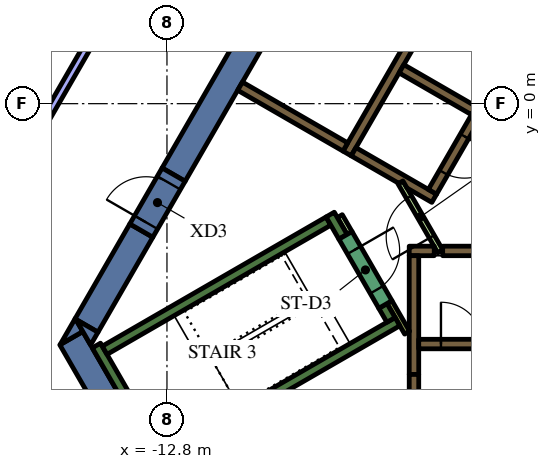
"""IFC4 building model, lengths in metres.
Left out: names, types, materials, properties, quantities, classifications, styles, units other than length and angle.
Written with IfcOpenShell. Run it as: python <this file> out.ifc"""

import sys

from ifc_helpers import new_model, si_unit, direction, frame, frame_2d, origin, place, context, subcontext, project, spatial, polyline, rectangle, outline, extrude, element, fill, save


model = new_model("IFC4")
c1 = context("Model", 3, precision=1e-05, world=origin(), true_north=direction((0.0, 1.0)))
c2 = subcontext(c1, "Body", "Model", "MODEL_VIEW")
j1 = project(units=[si_unit("LENGTHUNIT", "METRE"), si_unit("PLANEANGLEUNIT", "RADIAN")], contexts=[c1])
p1 = place(None, origin())
s1 = spatial("IfcSite", under=j1, at=p1, CompositionType="ELEMENT")
p2 = place(p1, origin())
s2 = spatial("IfcBuilding", under=s1, at=p2, CompositionType="ELEMENT")
p3 = place(p2, frame((0.0, 0.0, 235.2)))
s3 = spatial("IfcBuildingStorey", under=s2, at=p3, CompositionType="ELEMENT", Elevation=235.2)
p4 = place(p3, frame((-13.402, -9.487, 0.0), z_axis=(0.0, 0.0, 1.0), x_axis=(-0.500020498207, 0.866013568815, 0.0)))
e1 = element("IfcWall", 1, at=p4, inside=s3, PredefinedType="SOLIDWALL", context=c2, shape_type="SweptSolid", body=[
    extrude(rectangle(XDim=3.829, YDim=0.7, at=frame_2d((1.915, 0.0))), origin(), (0.0, 0.0, 1.0), 4.2),
])
p5 = place(p3, origin())
e2 = element("IfcWall", 2, at=p5, inside=s3, PredefinedType="SOLIDWALL", context=c2, shape_type="SweptSolid", body=[
    extrude(outline(polyline([(-15.014, -5.995), (-15.611, -6.339), (-15.213, -5.65), (-15.014, -5.995)])), origin(), (0.0, 0.0, 1.0), 4.2),
])
p6 = place(p3, frame((-13.475, -3.339, 0.0), z_axis=(0.0, 0.0, 1.0), x_axis=(-0.499944726303, -0.866057313716, 0.0)))
e3 = element("IfcWall", 3, at=p6, inside=s3, PredefinedType="SOLIDWALL", context=c2, shape_type="SweptSolid", body=[
    extrude(rectangle(XDim=2.884, YDim=0.7, at=frame_2d((1.442, 0.0))), origin(), (0.0, 0.0, 1.0), 4.2),
])
e4 = element("IfcWall", 4, at=p5, inside=s3, PredefinedType="SOLIDWALL", context=c2, shape_type="SweptSolid", body=[
    extrude(outline(polyline([(-14.809, -6.35), (-15.197, -5.678), (-14.615, -6.014), (-14.809, -6.35)])), origin(), (0.0, 0.0, 1.0), 4.2),
])
p7 = place(p3, frame((-12.625, -1.867, 0.0), z_axis=(0.0, 0.0, 1.0), x_axis=(0.500008520515, 0.866020484407, 0.0)))
e5 = element("IfcWall", 5, at=p7, inside=s3, PredefinedType="SOLIDWALL", context=c2, shape_type="SweptSolid", body=[
    extrude(rectangle(XDim=15.859, YDim=0.7, at=frame_2d((7.929, 0.0))), origin(), (0.0, 0.0, 1.0), 4.2),
])
p8 = place(p3, frame((-12.84, -9.511, 0.0), z_axis=(0.0, 0.0, 1.0), x_axis=(-0.499997733992, 0.866026712061, 0.0)))
e6 = element("IfcWall", 6, at=p8, inside=s3, PredefinedType="SOLIDWALL", context=c2, shape_type="SweptSolid", body=[
    extrude(rectangle(XDim=3.634, YDim=0.25, at=frame_2d((1.817, 0.0))), origin(), (0.0, 0.0, 1.0), 4.2),
])
p9 = place(p3, frame((-14.44, -6.49, 0.0), z_axis=(0.0, 0.0, 1.0), x_axis=(0.866022966069, 0.500004222222, 0.0)))
e7 = element("IfcWall", 7, at=p9, inside=s3, PredefinedType="SOLIDWALL", context=c2, shape_type="SweptSolid", body=[
    extrude(rectangle(XDim=6.8, YDim=0.25, at=frame_2d((3.4, 0.0))), origin(), (0.0, 0.0, 1.0), 4.2),
])
p10 = place(p3, frame((-8.168, -3.503, 0.0), z_axis=(0.0, 0.0, 1.0), x_axis=(-0.499952099219, 0.866053057547, 0.0)))
e8 = element("IfcWall", 8, at=p10, inside=s3, PredefinedType="SOLIDWALL", context=c2, shape_type="SweptSolid", body=[
    extrude(rectangle(XDim=0.675, YDim=0.25, at=frame_2d((0.337, 0.0))), origin(), (0.0, 0.0, 1.0), 4.2),
])
p11 = place(p3, frame((-12.84, -9.261, 0.0), z_axis=(0.0, 0.0, 1.0), x_axis=(0.866016039709, 0.500016218704, 0.0)))
e9 = element("IfcWall", 9, at=p11, inside=s3, PredefinedType="SOLIDWALL", context=c2, shape_type="SweptSolid", body=[
    extrude(rectangle(XDim=7.05, YDim=0.25, at=frame_2d((3.525, 0.0))), origin(), (0.0, 0.0, 1.0), 4.2),
])
p12 = place(p3, frame((-6.905, -5.69, 0.0), z_axis=(0.0, 0.0, 1.0), x_axis=(-0.500402024738, 0.865793170242, 0.0)))
e10 = element("IfcWall", 10, at=p12, inside=s3, PredefinedType="SOLIDWALL", context=c2, shape_type="SweptSolid", body=[
    extrude(rectangle(XDim=0.425, YDim=0.25, at=frame_2d((0.212, 0.0))), origin(), (0.0, 0.0, 1.0), 4.2),
])
p13 = place(p3, frame((-5.545, -3.875, 0.0), z_axis=(0.0, 0.0, 1.0), x_axis=(1.0, 0.0, 0.0)))
e11 = element("IfcWall", 11, at=p13, inside=s3, PredefinedType="SOLIDWALL", context=c2, shape_type="SweptSolid", body=[
    extrude(rectangle(XDim=11.97, YDim=0.25, at=frame_2d((5.985, 0.0))), origin(), (0.0, 0.0, 1.0), 4.2),
])
p14 = place(p3, frame((-6.425, -3.875, 0.0), z_axis=(0.0, 0.0, 1.0), x_axis=(1.0, 0.0, 0.0)))
e12 = element("IfcWall", 12, at=p14, inside=s3, PredefinedType="SOLIDWALL", context=c2, shape_type="SweptSolid", body=[
    extrude(rectangle(XDim=0.658, YDim=0.25, at=frame_2d((0.329, 0.0))), origin(), (0.0, 0.0, 1.0), 4.2),
])
p15 = place(p3, frame((-6.3, -7.125, 0.0), z_axis=(0.0, 0.0, 1.0), x_axis=(0.0, 1.0, 0.0)))
e13 = element("IfcWall", 13, at=p15, inside=s3, PredefinedType="SOLIDWALL", context=c2, shape_type="SweptSolid", body=[
    extrude(rectangle(XDim=3.125, YDim=0.25, at=frame_2d((1.562, 0.0))), origin(), (0.0, 0.0, 1.0), 4.2),
])
p16 = place(p3, frame((-8.06, -1.311, 0.0), z_axis=(0.0, 0.0, 1.0), x_axis=(0.50000273126, 0.866023826885, 0.0)))
e14 = element("IfcWall", 14, at=p16, inside=s3, PredefinedType="SOLIDWALL", context=c2, shape_type="SweptSolid", body=[
    extrude(rectangle(XDim=10.33, YDim=0.25, at=frame_2d((5.165, 0.0))), origin(), (0.0, 0.0, 1.0), 4.2),
])
p17 = place(p3, frame((-4.724, -0.182, 0.0), z_axis=(0.0, 0.0, 1.0), x_axis=(-0.866008176907, 0.50002983664, 0.0)))
e15 = element("IfcWall", 15, at=p17, inside=s3, PredefinedType="SOLIDWALL", context=c2, shape_type="SweptSolid", body=[
    extrude(rectangle(XDim=2.2, YDim=0.25, at=frame_2d((1.1, 0.0))), origin(), (0.0, 0.0, 1.0), 4.2),
])
e16 = element("IfcWall", 16, at=p5, inside=s3, PredefinedType="SOLIDWALL", context=c2, shape_type="SweptSolid", body=[
    extrude(outline(polyline([(-5.922, -2.257), (-5.922, -2.257), (-5.705, -2.382), (-5.83, -2.598), (-6.483, -2.221), (-6.591, -2.033), (-6.591, -2.033), (-6.7, -2.096), (-7.952, -1.373), (-7.827, -1.156), (-5.922, -2.257)])), origin(), (0.0, 0.0, 1.0), 4.2),
])
p18 = place(p3, frame((-8.106, -1.14, 0.0), z_axis=(0.0, 0.0, 1.0), x_axis=(-0.866008981251, 0.500028443584, 0.0)))
e17 = element("IfcWall", 17, at=p18, inside=s3, PredefinedType="SOLIDWALL", context=c2, shape_type="SweptSolid", body=[
    extrude(rectangle(XDim=3.2, YDim=0.25, at=frame_2d((1.6, 0.0))), origin(), (0.0, 0.0, 1.0), 4.2),
])
p19 = place(p3, frame((-8.252, -2.958, 0.0), z_axis=(0.0, 0.0, 1.0), x_axis=(0.500174715838, -0.865924508047, 0.0)))
e18 = element("IfcWall", 18, at=p19, inside=s3, PredefinedType="PARTITIONING", context=c2, shape_type="SweptSolid", body=[
    extrude(rectangle(XDim=0.514, YDim=0.15, at=frame_2d((0.257, 0.0))), origin(), (0.0, 0.0, 1.0), 3.45),
])
p20 = place(p3, frame((-6.48, -6.027, 0.0), z_axis=(0.0, 0.0, 1.0), x_axis=(-0.499927229454, 0.866067413802, 0.0)))
e19 = element("IfcWall", 19, at=p20, inside=s3, PredefinedType="PARTITIONING", context=c2, shape_type="SweptSolid", body=[
    extrude(rectangle(XDim=0.929, YDim=0.15, at=frame_2d((0.464, 0.0))), origin(), (0.0, 0.0, 1.0), 4.2),
])
p21 = place(p3, frame((-6.175, -6.325, 0.0), z_axis=(0.0, 0.0, 1.0), x_axis=(1.0, 0.0, 0.0)))
e20 = element("IfcWall", 20, at=p21, inside=s3, PredefinedType="SOLIDWALL", context=c2, shape_type="SweptSolid", body=[
    extrude(rectangle(XDim=12.35, YDim=0.25, at=frame_2d((6.175, 0.0))), origin(), (0.0, 0.0, 1.0), 4.2),
])
p22 = place(p21, frame((0.585, 0.0, 0.0)))
e21 = element("IfcOpeningElement", 21, at=p22, cuts=e20, PredefinedType="OPENING", context=c2, shape_type="SweptSolid", body=[
    extrude(rectangle(XDim=1.1, YDim=2.1, at=frame_2d((0.55, 1.05))), frame((0.0, 0.135, 0.0), z_axis=(0.0, -1.0, 0.0), x_axis=(1.0, 0.0, 0.0)), (0.0, 0.0, 1.0), 0.27),
])
p23 = place(p21, frame((3.105, 0.0, 0.0)))
e22 = element("IfcOpeningElement", 22, at=p23, cuts=e20, PredefinedType="OPENING", context=c2, shape_type="SweptSolid", body=[
    extrude(rectangle(XDim=1.1, YDim=2.1, at=frame_2d((0.55, 1.05))), frame((0.0, 0.135, 0.0), z_axis=(0.0, -1.0, 0.0), x_axis=(1.0, 0.0, 0.0)), (0.0, 0.0, 1.0), 0.27),
])
p24 = place(p21, frame((5.625, 0.0, 0.0)))
e23 = element("IfcOpeningElement", 23, at=p24, cuts=e20, PredefinedType="OPENING", context=c2, shape_type="SweptSolid", body=[
    extrude(rectangle(XDim=1.1, YDim=2.1, at=frame_2d((0.55, 1.05))), frame((0.0, 0.135, 0.0), z_axis=(0.0, -1.0, 0.0), x_axis=(1.0, 0.0, 0.0)), (0.0, 0.0, 1.0), 0.27),
])
p25 = place(p21, frame((8.145, 0.0, 0.0)))
e24 = element("IfcOpeningElement", 24, at=p25, cuts=e20, PredefinedType="OPENING", context=c2, shape_type="SweptSolid", body=[
    extrude(rectangle(XDim=1.1, YDim=2.1, at=frame_2d((0.55, 1.05))), frame((0.0, 0.135, 0.0), z_axis=(0.0, -1.0, 0.0), x_axis=(1.0, 0.0, 0.0)), (0.0, 0.0, 1.0), 0.27),
])
p26 = place(p21, frame((10.665, 0.0, 0.0)))
e25 = element("IfcOpeningElement", 25, at=p26, cuts=e20, PredefinedType="OPENING", context=c2, shape_type="SweptSolid", body=[
    extrude(rectangle(XDim=1.1, YDim=2.1, at=frame_2d((0.55, 1.05))), frame((0.0, 0.135, 0.0), z_axis=(0.0, -1.0, 0.0), x_axis=(1.0, 0.0, 0.0)), (0.0, 0.0, 1.0), 0.27),
])
p27 = place(p3, frame((-0.898, 6.194, 0.0), z_axis=(0.0, 0.0, 1.0), x_axis=(-0.499996202215, -0.866027596426, 0.0)))
e26 = element("IfcWall", 26, at=p27, inside=s3, PredefinedType="SOLIDWALL", context=c2, shape_type="SweptSolid", body=[
    extrude(rectangle(XDim=9.83, YDim=0.25, at=frame_2d((4.915, 0.0))), origin(), (0.0, 0.0, 1.0), 4.2),
])
p28 = place(p27, frame((0.585, 0.0, 0.0)))
e27 = element("IfcOpeningElement", 27, at=p28, cuts=e26, PredefinedType="OPENING", context=c2, shape_type="SweptSolid", body=[
    extrude(rectangle(XDim=1.1, YDim=2.1, at=frame_2d((0.55, 1.05))), frame((0.0, 0.135, 0.0), z_axis=(0.0, -1.0, 0.0), x_axis=(1.0, 0.0, 0.0)), (0.0, 0.0, 1.0), 0.27),
])
p29 = place(p27, frame((3.105, 0.0, 0.0)))
e28 = element("IfcOpeningElement", 28, at=p29, cuts=e26, PredefinedType="OPENING", context=c2, shape_type="SweptSolid", body=[
    extrude(rectangle(XDim=1.1, YDim=2.1, at=frame_2d((0.55, 1.05))), frame((0.0, 0.135, 0.0), z_axis=(0.0, -1.0, 0.0), x_axis=(1.0, 0.0, 0.0)), (0.0, 0.0, 1.0), 0.27),
])
p30 = place(p27, frame((5.625, 0.0, 0.0)))
e29 = element("IfcOpeningElement", 29, at=p30, cuts=e26, PredefinedType="OPENING", context=c2, shape_type="SweptSolid", body=[
    extrude(rectangle(XDim=1.1, YDim=2.1, at=frame_2d((0.55, 1.05))), frame((0.0, 0.135, 0.0), z_axis=(0.0, -1.0, 0.0), x_axis=(1.0, 0.0, 0.0)), (0.0, 0.0, 1.0), 0.27),
])
p31 = place(p27, frame((8.145, 0.0, 0.0)))
e30 = element("IfcOpeningElement", 30, at=p31, cuts=e26, PredefinedType="OPENING", context=c2, shape_type="SweptSolid", body=[
    extrude(rectangle(XDim=1.1, YDim=2.1, at=frame_2d((0.55, 1.05))), frame((0.0, 0.135, 0.0), z_axis=(0.0, -1.0, 0.0), x_axis=(1.0, 0.0, 0.0)), (0.0, 0.0, 1.0), 0.27),
])
p32 = place(p3, frame((-8.103, -3.466, 0.0), z_axis=(0.0, 0.0, 1.0), x_axis=(0.500078061341, -0.865980330357, 0.0)))
e31 = element("IfcWall", 31, at=p32, inside=s3, PredefinedType="SOLIDWALL", context=c2, shape_type="SweptSolid", body=[
    extrude(rectangle(XDim=2.1, YDim=0.4, at=frame_2d((1.05, 0.0))), origin(), (0.0, 0.0, 1.0), 4.2),
])
p33 = place(p32, frame((0.45, 0.0, 0.0)))
e32 = element("IfcOpeningElement", 32, at=p33, cuts=e31, PredefinedType="OPENING", context=c2, shape_type="SweptSolid", body=[
    extrude(rectangle(XDim=1.2, YDim=2.1, at=frame_2d((0.6, 1.05))), frame((0.0, 0.21, 0.0), z_axis=(0.0, -1.0, 0.0), x_axis=(1.0, 0.0, 0.0)), (0.0, 0.0, 1.0), 0.42),
])
p34 = place(p3, frame((-6.3, -7.125, 0.0), z_axis=(0.0, 0.0, 1.0), x_axis=(0.0, -1.0, 0.0)))
e33 = element("IfcWall", 33, at=p34, inside=s3, PredefinedType="SOLIDWALL", context=c2, shape_type="SweptSolid", body=[
    extrude(rectangle(XDim=1.8, YDim=0.25, at=frame_2d((0.9, 0.0))), origin(), (0.0, 0.0, 1.0), 4.2),
])
p35 = place(p34, frame((0.45, 0.0, 0.0)))
e34 = element("IfcOpeningElement", 34, at=p35, cuts=e33, PredefinedType="OPENING", context=c2, shape_type="SweptSolid", body=[
    extrude(rectangle(XDim=0.9, YDim=2.1, at=frame_2d((0.45, 1.05))), frame((0.0, 0.135, 0.0), z_axis=(0.0, -1.0, 0.0), x_axis=(1.0, 0.0, 0.0)), (0.0, 0.0, 1.0), 0.27),
])
p36 = place(p3, frame((-5.606, -3.89, 0.0), z_axis=(0.0, 0.0, 1.0), x_axis=(-0.500027713859, 0.866009402589, 0.0)))
e35 = element("IfcWall", 35, at=p36, inside=s3, PredefinedType="PARTITIONING", context=c2, shape_type="SweptSolid", body=[
    extrude(rectangle(XDim=2.1, YDim=0.15, at=frame_2d((1.05, 0.0))), origin(), (0.0, 0.0, 1.0), 3.45),
])
p37 = place(p36, frame((0.45, 0.0, 0.0)))
e36 = element("IfcOpeningElement", 36, at=p37, cuts=e35, PredefinedType="OPENING", context=c2, shape_type="SweptSolid", body=[
    extrude(rectangle(XDim=1.2, YDim=2.1, at=frame_2d((0.6, 1.05))), frame((0.0, 0.085, 0.0), z_axis=(0.0, -1.0, 0.0), x_axis=(1.0, 0.0, 0.0)), (0.0, 0.0, 1.0), 0.17),
])
p38 = place(p3, frame((-13.475, -3.339, 0.0), z_axis=(0.0, 0.0, 1.0), x_axis=(0.499954529098, 0.86605165483, 0.0)))
e37 = element("IfcWall", 37, at=p38, inside=s3, PredefinedType="SOLIDWALL", context=c2, shape_type="SweptSolid", body=[
    extrude(rectangle(XDim=1.7, YDim=0.7, at=frame_2d((0.85, 0.0))), origin(), (0.0, 0.0, 1.0), 4.2),
])
p39 = place(p38, frame((0.25, 0.0, 0.0)))
e38 = element("IfcOpeningElement", 38, at=p39, cuts=e37, PredefinedType="OPENING", context=c2, shape_type="SweptSolid", body=[
    extrude(rectangle(XDim=1.2, YDim=2.1, at=frame_2d((0.6, 1.05))), frame((0.0, 0.36, 0.0), z_axis=(0.0, -1.0, 0.0), x_axis=(1.0, 0.0, 0.0)), (0.0, 0.0, 1.0), 0.72),
])
p40 = place(p3, frame((-11.871, 6.738, 0.0), z_axis=(0.0, 0.0, 1.0), x_axis=(-0.500019350398, -0.866014231539, 0.0)))
e39 = element("IfcWall", 39, at=p40, inside=s3, PredefinedType="PARTITIONING", context=c2, shape_type="SweptSolid", body=[
    extrude(rectangle(XDim=9.42, YDim=0.2, at=frame_2d((4.71, 0.0))), origin(), (0.0, 0.0, 1.0), 3.45),
])
p41 = place(p40, frame((4.2, 0.0, 0.0)))
e40 = element("IfcOpeningElement", 40, at=p41, cuts=e39, PredefinedType="OPENING", context=c2, shape_type="SweptSolid", body=[
    extrude(rectangle(XDim=1.0, YDim=2.1, at=frame_2d((0.5, 1.05))), frame((0.0, 0.11, 0.0), z_axis=(0.0, -1.0, 0.0), x_axis=(1.0, 0.0, 0.0)), (0.0, 0.0, 1.0), 0.22),
])
p42 = place(p3, frame((-17.531, -6.635, 0.0), z_axis=(0.0, 0.0, 1.0), x_axis=(0.500009459589, -0.866019942219, 0.0)))
e41 = element("IfcWall", 41, at=p42, inside=s3, PredefinedType="PARTITIONING", context=c2, shape_type="SweptSolid", body=[
    extrude(rectangle(XDim=6.038, YDim=0.2, at=frame_2d((3.019, 0.0))), origin(), (0.0, 0.0, 1.0), 3.45),
])
p43 = place(p42, frame((2.5, 0.0, 0.0)))
e42 = element("IfcOpeningElement", 42, at=p43, cuts=e41, PredefinedType="OPENING", context=c2, shape_type="SweptSolid", body=[
    extrude(rectangle(XDim=1.0, YDim=2.1, at=frame_2d((0.5, 1.05))), frame((0.0, 0.11, 0.0), z_axis=(0.0, -1.0, 0.0), x_axis=(1.0, 0.0, 0.0)), (0.0, 0.0, 1.0), 0.22),
])
p44 = place(p22, origin())
e43 = element("IfcDoor", 43, at=p44, inside=s3, OperationType="DOUBLE_DOOR_SLIDING", PredefinedType="DOOR", context=c2, shape_type="SweptSolid", body=[
    extrude(rectangle(XDim=1.1, YDim=2.1, at=frame_2d((0.55, 1.05))), frame((0.0, 0.025, 0.0), z_axis=(0.0, -1.0, 0.0), x_axis=(1.0, 0.0, 0.0)), (0.0, 0.0, 1.0), 0.05),
])
fill(e21, e43)
p45 = place(p31, origin())
e44 = element("IfcDoor", 44, at=p45, inside=s3, OperationType="DOUBLE_DOOR_SLIDING", PredefinedType="DOOR", context=c2, shape_type="SweptSolid", body=[
    extrude(rectangle(XDim=1.1, YDim=2.1, at=frame_2d((0.55, 1.05))), frame((0.0, 0.025, 0.0), z_axis=(0.0, -1.0, 0.0), x_axis=(1.0, 0.0, 0.0)), (0.0, 0.0, 1.0), 0.05),
])
fill(e30, e44)
p46 = place(p33, origin())
e45 = element("IfcDoor", 45, at=p46, inside=s3, OperationType="SINGLE_SWING_LEFT", PredefinedType="DOOR", context=c2, shape_type="SweptSolid", body=[
    extrude(rectangle(XDim=1.2, YDim=2.1, at=frame_2d((0.6, 1.05))), frame((0.0, 0.025, 0.0), z_axis=(0.0, -1.0, 0.0), x_axis=(1.0, 0.0, 0.0)), (0.0, 0.0, 1.0), 0.05),
])
fill(e32, e45)
p47 = place(p37, origin())
e46 = element("IfcDoor", 46, at=p47, inside=s3, OperationType="SINGLE_SWING_LEFT", PredefinedType="DOOR", context=c2, shape_type="SweptSolid", body=[
    extrude(rectangle(XDim=1.2, YDim=2.1, at=frame_2d((0.6, 1.05))), frame((0.0, 0.025, 0.0), z_axis=(0.0, -1.0, 0.0), x_axis=(1.0, 0.0, 0.0)), (0.0, 0.0, 1.0), 0.05),
])
fill(e36, e46)
p48 = place(p39, origin())
e47 = element("IfcDoor", 47, at=p48, inside=s3, OperationType="SINGLE_SWING_LEFT", PredefinedType="DOOR", context=c2, shape_type="SweptSolid", body=[
    extrude(rectangle(XDim=1.2, YDim=2.1, at=frame_2d((0.6, 1.05))), frame((0.0, 0.025, 0.0), z_axis=(0.0, -1.0, 0.0), x_axis=(1.0, 0.0, 0.0)), (0.0, 0.0, 1.0), 0.05),
])
fill(e38, e47)
save(model, sys.argv[1])
